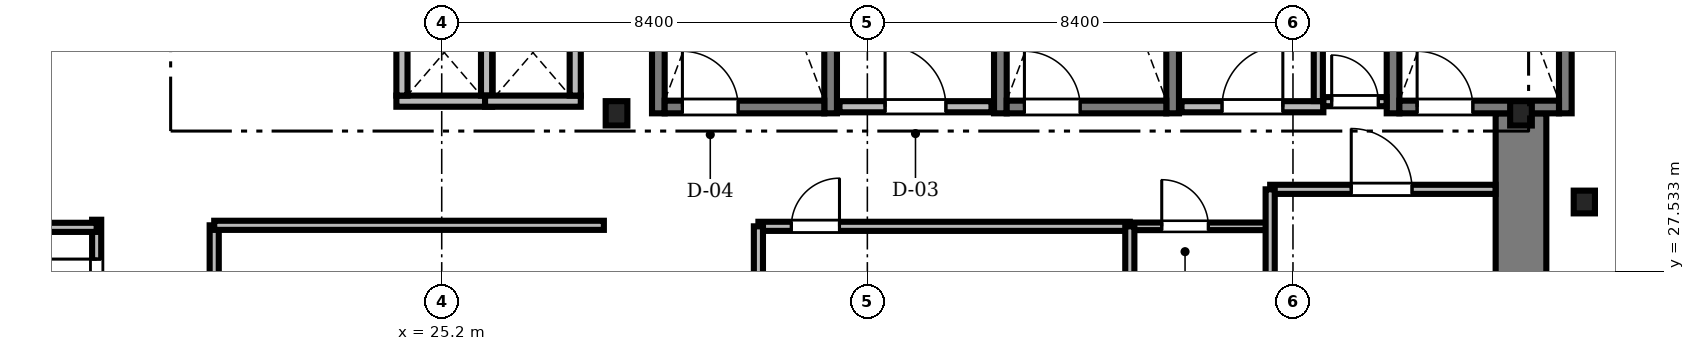
"""IFC4 building model, lengths in metres.
Left out: names, types, materials, properties, quantities, classifications, styles, units other than length and angle.
Written with IfcOpenShell. Run it as: python <this file> out.ifc"""

import sys

from ifc_helpers import new_model, si_unit, direction, frame, frame_2d, origin, origin_2d, place, context, subcontext, project, spatial, rectangle, i_section, extrude, source, transform, mapped, element, fill, save


model = new_model("IFC4")
c1 = context("Model", 3, precision=1e-05, world=origin(), true_north=direction((0.0, 1.0)))
c2 = subcontext(c1, "Body", "Model", "MODEL_VIEW")
j1 = project(units=[si_unit("LENGTHUNIT", "METRE"), si_unit("PLANEANGLEUNIT", "RADIAN")], contexts=[c1])
p1 = place(None, origin())
s1 = spatial("IfcSite", under=j1, at=p1, CompositionType="ELEMENT")
p2 = place(p1, origin())
s2 = spatial("IfcBuilding", under=s1, at=p2, CompositionType="ELEMENT")
p3 = place(p2, frame((0.0, 0.0, 38.55)))
s3 = spatial("IfcBuildingStorey", under=s2, at=p3, CompositionType="ELEMENT", Elevation=38.55)
m1 = source(origin(), c2, "Body", "SweptSolid", [
    extrude(rectangle(XDim=13.15, YDim=1.0, at=frame_2d((6.575, 0.0))), origin(), (0.0, 0.0, 1.0), 3.41),
])
p4 = place(p3, frame((46.5, 17.5, 0.0), z_axis=(0.0, 0.0, 1.0), x_axis=(0.0, 1.0, 0.0)))
e1 = element("IfcWall", 1, at=p4, inside=s3, PredefinedType="SHEAR", context=c2, shape_type="MappedRepresentation", body=[
    mapped(m1, transform((0.0, 0.0, 0.0), scale=1.0)),
])
m2 = source(origin(), c2, "Body", "SweptSolid", [
    extrude(i_section(OverallWidth=0.428, OverallDepth=0.481, WebThickness=0.04, FlangeThickness=0.063, FilletRadius=0.015, at=origin_2d()), origin(), (0.0, 0.0, 1.0), 3.41),
])
for number, where, z_axis, x_axis in (
    (2, (28.65, 30.65, 0.0), (0.0, 0.0, 1.0), (1.0, 0.0, 0.0)),
    (3, (46.5, 30.65, 0.0), (0.0, 0.0, 1.0), (1.0, 0.0, 0.0)),
):
    element("IfcColumn", number, at=place(p3, frame(where, z_axis=z_axis, x_axis=x_axis)), inside=s3, PredefinedType="COLUMN", context=c2, shape_type="MappedRepresentation", body=[
        mapped(m2, transform((0.0, 0.0, 0.0), scale=1.0)),
    ])
m3 = source(origin(), c2, "Body", "SweptSolid", [
    extrude(i_section(OverallWidth=0.419, OverallDepth=0.449, WebThickness=0.031, FlangeThickness=0.048, FilletRadius=0.015, at=origin_2d()), origin(), (0.0, 0.0, 1.0), 3.41),
])
p5 = place(p3, frame((47.75, 28.9, 0.0), z_axis=(0.0, 0.0, 1.0), x_axis=(1.0, 0.0, 0.0)))
e4 = element("IfcColumn", 4, at=p5, inside=s3, PredefinedType="COLUMN", context=c2, shape_type="MappedRepresentation", body=[
    mapped(m3, transform((0.0, 0.0, 0.0), scale=1.0)),
])
m4 = source(origin(), c2, "Body", "SweptSolid", [
    extrude(rectangle(XDim=9.15, YDim=0.25, at=frame_2d((4.575, 0.0))), origin(), (0.0, 0.0, 1.0), 3.45),
])
for number, where, z_axis, x_axis in (
    (5, (29.475, 30.65, 0.0), (0.0, 0.0, 1.0), (0.0, 1.0, 0.0)),
    (6, (32.875, 30.65, 0.0), (0.0, 0.0, 1.0), (0.0, 1.0, 0.0)),
):
    element("IfcWall", number, at=place(p3, frame(where, z_axis=z_axis, x_axis=x_axis)), inside=s3, PredefinedType="SOLIDWALL", context=c2, shape_type="MappedRepresentation", body=[
        mapped(m4, transform((0.0, 0.0, 0.0), scale=1.0)),
    ])
m5 = source(origin(), c2, "Body", "SweptSolid", [
    extrude(rectangle(XDim=3.15, YDim=0.25, at=frame_2d((1.575, 0.0))), origin(), (0.0, 0.0, 1.0), 3.45),
])
p6 = place(p3, frame((29.6, 30.775, 0.0), z_axis=(0.0, 0.0, 1.0), x_axis=(1.0, 0.0, 0.0)))
e7 = element("IfcWall", 7, at=p6, inside=s3, PredefinedType="SOLIDWALL", context=c2, shape_type="MappedRepresentation", body=[
    mapped(m5, transform((0.0, 0.0, 0.0), scale=1.0)),
])
m6 = source(origin(), c2, "Body", "SweptSolid", [
    extrude(rectangle(XDim=1.1, YDim=2.2, at=frame_2d((0.55, 1.1))), frame((0.0, 0.135, 0.0), z_axis=(0.0, -1.0, 0.0), x_axis=(1.0, 0.0, 0.0)), (0.0, 0.0, 1.0), 0.27),
])
p7 = place(p6, frame((0.35, 0.0, 0.0)))
e8 = element("IfcOpeningElement", 8, at=p7, cuts=e7, PredefinedType="OPENING", context=c2, shape_type="MappedRepresentation", body=[
    mapped(m6, transform((0.0, 0.0, 0.0), scale=1.0)),
])
for number, where, z_axis, x_axis in (
    (9, (36.225, 30.65, 0.0), (0.0, 0.0, 1.0), (0.0, 1.0, 0.0)),
    (10, (39.625, 30.65, 0.0), (0.0, 0.0, 1.0), (0.0, 1.0, 0.0)),
):
    element("IfcWall", number, at=place(p3, frame(where, z_axis=z_axis, x_axis=x_axis)), inside=s3, PredefinedType="SOLIDWALL", context=c2, shape_type="MappedRepresentation", body=[
        mapped(m4, transform((0.0, 0.0, 0.0), scale=1.0)),
    ])
p8 = place(p3, frame((36.35, 30.775, 0.0), z_axis=(0.0, 0.0, 1.0), x_axis=(1.0, 0.0, 0.0)))
e11 = element("IfcWall", 11, at=p8, inside=s3, PredefinedType="SOLIDWALL", context=c2, shape_type="MappedRepresentation", body=[
    mapped(m5, transform((0.0, 0.0, 0.0), scale=1.0)),
])
p9 = place(p8, frame((0.35, 0.0, 0.0)))
e12 = element("IfcOpeningElement", 12, at=p9, cuts=e11, PredefinedType="OPENING", context=c2, shape_type="MappedRepresentation", body=[
    mapped(m6, transform((0.0, 0.0, 0.0), scale=1.0)),
])
for number, where, z_axis, x_axis in (
    (13, (43.975, 30.65, 0.0), (0.0, 0.0, 1.0), (0.0, 1.0, 0.0)),
    (14, (47.375, 30.65, 0.0), (0.0, 0.0, 1.0), (0.0, 1.0, 0.0)),
):
    element("IfcWall", number, at=place(p3, frame(where, z_axis=z_axis, x_axis=x_axis)), inside=s3, PredefinedType="SOLIDWALL", context=c2, shape_type="MappedRepresentation", body=[
        mapped(m4, transform((0.0, 0.0, 0.0), scale=1.0)),
    ])
p10 = place(p3, frame((44.1, 30.775, 0.0), z_axis=(0.0, 0.0, 1.0), x_axis=(1.0, 0.0, 0.0)))
e15 = element("IfcWall", 15, at=p10, inside=s3, PredefinedType="SOLIDWALL", context=c2, shape_type="MappedRepresentation", body=[
    mapped(m5, transform((0.0, 0.0, 0.0), scale=1.0)),
])
p11 = place(p10, frame((0.35, 0.0, 0.0)))
e16 = element("IfcOpeningElement", 16, at=p11, cuts=e15, PredefinedType="OPENING", context=c2, shape_type="MappedRepresentation", body=[
    mapped(m6, transform((0.0, 0.0, 0.0), scale=1.0)),
])
m7 = source(origin(), c2, "Body", "SweptSolid", [
    extrude(rectangle(XDim=3.0, YDim=0.22, at=frame_2d((1.5, 0.0))), origin(), (0.0, 0.0, 1.0), 3.41),
])
p12 = place(p3, frame((33.05, 30.78, 0.0), z_axis=(0.0, 0.0, 1.0), x_axis=(1.0, 0.0, 0.0)))
e17 = element("IfcWall", 17, at=p12, inside=s3, PredefinedType="SOLIDWALL", context=c2, shape_type="MappedRepresentation", body=[
    mapped(m7, transform((0.0, 0.0, 0.0), scale=1.0)),
])
m8 = source(origin(), c2, "Body", "SweptSolid", [
    extrude(rectangle(XDim=1.2, YDim=2.2, at=frame_2d((0.6, 1.1))), frame((0.0, 0.12, 0.0), z_axis=(0.0, -1.0, 0.0), x_axis=(1.0, 0.0, 0.0)), (0.0, 0.0, 1.0), 0.24),
])
p13 = place(p12, frame((0.9, 0.0, 0.0)))
e18 = element("IfcOpeningElement", 18, at=p13, cuts=e17, PredefinedType="OPENING", context=c2, shape_type="MappedRepresentation", body=[
    mapped(m8, transform((0.0, 0.0, 0.0), scale=1.0)),
])
m9 = source(origin(), c2, "Body", "SweptSolid", [
    extrude(rectangle(XDim=2.8, YDim=0.22, at=frame_2d((1.4, 0.0))), origin(), (0.0, 0.0, 1.0), 3.41),
])
p14 = place(p3, frame((39.8, 30.78, 0.0), z_axis=(0.0, 0.0, 1.0), x_axis=(1.0, 0.0, 0.0)))
e19 = element("IfcWall", 19, at=p14, inside=s3, PredefinedType="SOLIDWALL", context=c2, shape_type="MappedRepresentation", body=[
    mapped(m9, transform((0.0, 0.0, 0.0), scale=1.0)),
])
p15 = place(p14, frame((0.8, 0.0, 0.0)))
e20 = element("IfcOpeningElement", 20, at=p15, cuts=e19, PredefinedType="OPENING", context=c2, shape_type="MappedRepresentation", body=[
    mapped(m8, transform((0.0, 0.0, 0.0), scale=1.0)),
])
m10 = source(origin(), c2, "Body", "SweptSolid", [
    extrude(rectangle(XDim=1.89, YDim=0.22, at=frame_2d((0.945, 0.0))), origin(), (0.0, 0.0, 1.0), 3.41),
])
p16 = place(p3, frame((24.305, 30.89, 0.0), z_axis=(0.0, 0.0, 1.0), x_axis=(1.0, 0.0, 0.0)))
e21 = element("IfcWall", 21, at=p16, inside=s3, PredefinedType="SOLIDWALL", context=c2, shape_type="MappedRepresentation", body=[
    mapped(m10, transform((0.0, 0.0, 0.0), scale=1.0)),
])
m11 = source(origin(), c2, "Body", "SweptSolid", [
    extrude(rectangle(XDim=1.7, YDim=0.22, at=frame_2d((0.85, 0.0))), origin(), (0.0, 0.0, 1.0), 3.41),
])
for number, where, z_axis, x_axis in (
    (22, (24.415, 31.0, 0.0), (0.0, 0.0, 1.0), (0.0, 1.0, 0.0)),
    (23, (26.085, 31.0, 0.0), (0.0, 0.0, 1.0), (0.0, 1.0, 0.0)),
):
    element("IfcWall", number, at=place(p3, frame(where, z_axis=z_axis, x_axis=x_axis)), inside=s3, PredefinedType="SOLIDWALL", context=c2, shape_type="MappedRepresentation", body=[
        mapped(m11, transform((0.0, 0.0, 0.0), scale=1.0)),
    ])
p17 = place(p3, frame((26.055, 30.89, 0.0), z_axis=(0.0, 0.0, 1.0), x_axis=(1.0, 0.0, 0.0)))
e24 = element("IfcWall", 24, at=p17, inside=s3, PredefinedType="SOLIDWALL", context=c2, shape_type="MappedRepresentation", body=[
    mapped(m10, transform((0.0, 0.0, 0.0), scale=1.0)),
])
p18 = place(p3, frame((27.835, 31.0, 0.0), z_axis=(0.0, 0.0, 1.0), x_axis=(0.0, 1.0, 0.0)))
e25 = element("IfcWall", 25, at=p18, inside=s3, PredefinedType="SOLIDWALL", context=c2, shape_type="MappedRepresentation", body=[
    mapped(m11, transform((0.0, 0.0, 0.0), scale=1.0)),
])
m12 = source(origin(), c2, "Body", "SweptSolid", [
    extrude(rectangle(XDim=13.84, YDim=0.18, at=frame_2d((6.92, 0.0))), origin(), (0.0, 0.0, 1.0), 2.802),
])
p19 = place(p3, frame((18.39, 14.71, 0.0), z_axis=(0.0, 0.0, 1.0), x_axis=(0.0, 1.0, 0.0)))
e26 = element("IfcWall", 26, at=p19, inside=s3, PredefinedType="PARTITIONING", context=c2, shape_type="MappedRepresentation", body=[
    mapped(m12, transform((0.0, 0.0, 0.0), scale=1.0)),
])
m13 = source(origin(), c2, "Body", "SweptSolid", [
    extrude(rectangle(XDim=1.05, YDim=2.2, at=frame_2d((0.525, 1.1))), frame((0.0, 0.1, 0.0), z_axis=(0.0, -1.0, 0.0), x_axis=(1.0, 0.0, 0.0)), (0.0, 0.0, 1.0), 0.2),
])
p20 = place(p19, frame((1.762, 0.0, 0.0)))
e27 = element("IfcOpeningElement", 27, at=p20, cuts=e26, PredefinedType="OPENING", context=c2, shape_type="MappedRepresentation", body=[
    mapped(m13, transform((0.0, 0.0, 0.0), scale=1.0)),
])
m14 = source(origin(), c2, "Body", "SweptSolid", [
    extrude(rectangle(XDim=0.95, YDim=2.15, at=frame_2d((0.475, 1.075))), frame((0.0, 0.1, 0.0), z_axis=(0.0, -1.0, 0.0), x_axis=(1.0, 0.0, 0.0)), (0.0, 0.0, 1.0), 0.2),
])
p21 = place(p19, frame((7.55, 0.0, 0.0)))
e28 = element("IfcOpeningElement", 28, at=p21, cuts=e26, PredefinedType="OPENING", context=c2, shape_type="MappedRepresentation", body=[
    mapped(m14, transform((0.0, 0.0, 0.0), scale=1.0)),
])
p22 = place(p19, frame((12.113, 0.0, 0.0)))
e29 = element("IfcOpeningElement", 29, at=p22, cuts=e26, PredefinedType="OPENING", context=c2, shape_type="MappedRepresentation", body=[
    mapped(m14, transform((0.0, 0.0, 0.0), scale=1.0)),
])
m15 = source(origin(), c2, "Body", "SweptSolid", [
    extrude(rectangle(XDim=11.94, YDim=0.18, at=frame_2d((5.97, 0.0))), origin(), (0.0, 0.0, 1.0), 2.802),
])
p23 = place(p3, frame((20.71, 16.5, 0.0), z_axis=(0.0, 0.0, 1.0), x_axis=(0.0, 1.0, 0.0)))
e30 = element("IfcWall", 30, at=p23, inside=s3, PredefinedType="PARTITIONING", context=c2, shape_type="MappedRepresentation", body=[
    mapped(m15, transform((0.0, 0.0, 0.0), scale=1.0)),
])
p24 = place(p23, frame((4.5, 0.0, 0.0)))
e31 = element("IfcOpeningElement", 31, at=p24, cuts=e30, PredefinedType="OPENING", context=c2, shape_type="MappedRepresentation", body=[
    mapped(m13, transform((0.0, 0.0, 0.0), scale=1.0)),
])
m16 = source(origin(), c2, "Body", "SweptSolid", [
    extrude(rectangle(XDim=7.33, YDim=0.18, at=frame_2d((3.665, 0.0))), origin(), (0.0, 0.0, 1.0), 3.042),
])
p25 = place(p3, frame((31.45, 28.42, 0.0), z_axis=(0.0, 0.0, 1.0), x_axis=(1.0, 0.0, 0.0)))
e32 = element("IfcWall", 32, at=p25, inside=s3, PredefinedType="PARTITIONING", context=c2, shape_type="MappedRepresentation", body=[
    mapped(m16, transform((0.0, 0.0, 0.0), scale=1.0)),
])
p26 = place(p25, frame((0.65, 0.0, 0.0)))
e33 = element("IfcOpeningElement", 33, at=p26, cuts=e32, PredefinedType="OPENING", context=c2, shape_type="MappedRepresentation", body=[
    mapped(m14, transform((0.0, 0.0, 0.0), scale=1.0)),
])
m17 = source(origin(), c2, "Body", "SweptSolid", [
    extrude(rectangle(XDim=4.448, YDim=0.18, at=frame_2d((2.224, 0.0))), origin(), (0.0, 0.0, 1.0), 3.042),
])
p27 = place(p3, frame((41.55, 29.15, 0.0), z_axis=(0.0, 0.0, 1.0), x_axis=(1.0, 0.0, 0.0)))
e34 = element("IfcWall", 34, at=p27, inside=s3, PredefinedType="PARTITIONING", context=c2, shape_type="MappedRepresentation", body=[
    mapped(m17, transform((0.0, 0.0, 0.0), scale=1.0)),
])
m18 = source(origin(), c2, "Body", "SweptSolid", [
    extrude(rectangle(XDim=1.2, YDim=2.2, at=frame_2d((0.6, 1.1))), frame((0.0, 0.1, 0.0), z_axis=(0.0, -1.0, 0.0), x_axis=(1.0, 0.0, 0.0)), (0.0, 0.0, 1.0), 0.2),
])
p28 = place(p27, frame((1.6, 0.0, 0.0)))
e35 = element("IfcOpeningElement", 35, at=p28, cuts=e34, PredefinedType="OPENING", context=c2, shape_type="MappedRepresentation", body=[
    mapped(m18, transform((0.0, 0.0, 0.0), scale=1.0)),
])
m19 = source(origin(), c2, "Body", "SweptSolid", [
    extrude(rectangle(XDim=2.74, YDim=0.15, at=frame_2d((1.37, 0.0))), origin(), (0.0, 0.0, 1.0), 3.41),
])
p29 = place(p3, frame((38.78, 28.42, 0.0), z_axis=(0.0, 0.0, 1.0), x_axis=(1.0, 0.0, 0.0)))
e36 = element("IfcWall", 36, at=p29, inside=s3, PredefinedType="PARTITIONING", context=c2, shape_type="MappedRepresentation", body=[
    mapped(m19, transform((0.0, 0.0, 0.0), scale=1.0)),
])
m20 = source(origin(), c2, "Body", "SweptSolid", [
    extrude(rectangle(XDim=0.92, YDim=2.1, at=frame_2d((0.46, 1.05))), frame((0.0, 0.085, 0.0), z_axis=(0.0, -1.0, 0.0), x_axis=(1.0, 0.0, 0.0)), (0.0, 0.0, 1.0), 0.17),
])
p30 = place(p29, frame((0.63, 0.0, 0.0)))
e37 = element("IfcOpeningElement", 37, at=p30, cuts=e36, PredefinedType="OPENING", context=c2, shape_type="MappedRepresentation", body=[
    mapped(m20, transform((0.0, 0.0, 0.0), scale=1.0)),
])
m21 = source(origin(), c2, "Body", "SweptSolid", [
    extrude(rectangle(XDim=1.248, YDim=0.18, at=frame_2d((0.624, 0.0))), origin(), (0.0, 0.0, 1.0), 3.41),
])
p31 = place(p3, frame((42.6, 30.88, 0.0), z_axis=(0.0, 0.0, 1.0), x_axis=(1.0, 0.0, 0.0)))
e38 = element("IfcWall", 38, at=p31, inside=s3, PredefinedType="PARTITIONING", context=c2, shape_type="MappedRepresentation", body=[
    mapped(m21, transform((0.0, 0.0, 0.0), scale=1.0)),
])
m22 = source(origin(), c2, "Body", "SweptSolid", [
    extrude(rectangle(XDim=0.92, YDim=2.1, at=frame_2d((0.46, 1.05))), frame((0.0, 0.1, 0.0), z_axis=(0.0, -1.0, 0.0), x_axis=(1.0, 0.0, 0.0)), (0.0, 0.0, 1.0), 0.2),
])
p32 = place(p31, frame((0.164, 0.0, 0.0)))
e39 = element("IfcOpeningElement", 39, at=p32, cuts=e38, PredefinedType="OPENING", context=c2, shape_type="MappedRepresentation", body=[
    mapped(m22, transform((0.0, 0.0, 0.0), scale=1.0)),
])
m23 = source(origin(), c2, "Body", "SweptSolid", [
    extrude(rectangle(XDim=16.16, YDim=0.18, at=frame_2d((8.08, 0.0))), origin(), (0.0, 0.0, 1.0), 2.652),
])
p33 = place(p3, frame((2.23, 28.4, 0.0), z_axis=(0.0, 0.0, 1.0), x_axis=(1.0, 0.0, 0.0)))
e40 = element("IfcWall", 40, at=p33, inside=s3, PredefinedType="PARTITIONING", context=c2, shape_type="MappedRepresentation", body=[
    mapped(m23, transform((0.0, 0.0, 0.0), scale=1.0)),
])
m24 = source(origin(), c2, "Body", "SweptSolid", [
    extrude(rectangle(XDim=7.69, YDim=0.18, at=frame_2d((3.845, 0.0))), origin(), (0.0, 0.0, 1.0), 3.41),
])
p34 = place(p3, frame((20.71, 28.44, 0.0), z_axis=(0.0, 0.0, 1.0), x_axis=(1.0, 0.0, 0.0)))
e41 = element("IfcWall", 41, at=p34, inside=s3, PredefinedType="PARTITIONING", context=c2, shape_type="MappedRepresentation", body=[
    mapped(m24, transform((0.0, 0.0, 0.0), scale=1.0)),
])
m25 = source(origin(), c2, "Body", "SweptSolid", [
    extrude(rectangle(XDim=2.758, YDim=0.18, at=frame_2d((1.379, 0.0))), origin(), (0.0, 0.0, 1.0), 3.41),
])
p35 = place(p3, frame((42.5, 30.892, 0.0), z_axis=(0.0, 0.0, 1.0), x_axis=(0.0, 1.0, 0.0)))
e42 = element("IfcWall", 42, at=p35, inside=s3, PredefinedType="PARTITIONING", context=c2, shape_type="MappedRepresentation", body=[
    mapped(m25, transform((0.0, 0.0, 0.0), scale=1.0)),
])
m26 = source(origin(), c2, "Body", "SweptSolid", [
    extrude(rectangle(XDim=2.35, YDim=0.18, at=frame_2d((1.175, 0.0))), origin(), (0.0, 0.0, 1.0), 2.802),
])
p36 = place(p3, frame((41.55, 26.8, 0.0), z_axis=(0.0, 0.0, 1.0), x_axis=(0.0, 1.0, 0.0)))
e43 = element("IfcWall", 43, at=p36, inside=s3, PredefinedType="PARTITIONING", context=c2, shape_type="MappedRepresentation", body=[
    mapped(m26, transform((0.0, 0.0, 0.0), scale=1.0)),
])
m27 = source(origin(), c2, "Body", "SweptSolid", [
    extrude(rectangle(XDim=1.6, YDim=0.18, at=frame_2d((0.8, 0.0))), origin(), (0.0, 0.0, 1.0), 2.952),
])
for number, where, z_axis, x_axis in (
    (44, (31.45, 26.82, 0.0), (0.0, 0.0, 1.0), (0.0, 1.0, 0.0)),
    (45, (38.78, 26.82, 0.0), (0.0, 0.0, 1.0), (0.0, 1.0, 0.0)),
):
    element("IfcWall", number, at=place(p3, frame(where, z_axis=z_axis, x_axis=x_axis)), inside=s3, PredefinedType="PARTITIONING", context=c2, shape_type="MappedRepresentation", body=[
        mapped(m27, transform((0.0, 0.0, 0.0), scale=1.0)),
    ])
m28 = source(origin(), c2, "Body", "SweptSolid", [
    extrude(rectangle(XDim=1.1, YDim=2.2, at=frame_2d((0.55, 1.1))), frame((0.0, 0.025, 0.0), z_axis=(0.0, -1.0, 0.0), x_axis=(1.0, 0.0, 0.0)), (0.0, 0.0, 1.0), 0.05),
])
p37 = place(p7, origin())
e46 = element("IfcDoor", 46, at=p37, inside=s3, OperationType="SINGLE_SWING_LEFT", PredefinedType="DOOR", context=c2, shape_type="MappedRepresentation", body=[
    mapped(m28, transform((0.0, 0.0, 0.0), scale=1.0)),
])
fill(e8, e46)
p38 = place(p9, origin())
e47 = element("IfcDoor", 47, at=p38, inside=s3, OperationType="SINGLE_SWING_LEFT", PredefinedType="DOOR", context=c2, shape_type="MappedRepresentation", body=[
    mapped(m28, transform((0.0, 0.0, 0.0), scale=1.0)),
])
fill(e12, e47)
p39 = place(p11, origin())
e48 = element("IfcDoor", 48, at=p39, inside=s3, OperationType="SINGLE_SWING_LEFT", PredefinedType="DOOR", context=c2, shape_type="MappedRepresentation", body=[
    mapped(m28, transform((0.0, 0.0, 0.0), scale=1.0)),
])
fill(e16, e48)
m29 = source(origin(), c2, "Body", "SweptSolid", [
    extrude(rectangle(XDim=1.2, YDim=2.2, at=frame_2d((0.6, 1.1))), frame((0.0, 0.025, 0.0), z_axis=(0.0, -1.0, 0.0), x_axis=(1.0, 0.0, 0.0)), (0.0, 0.0, 1.0), 0.05),
])
p40 = place(p13, origin())
e49 = element("IfcDoor", 49, at=p40, inside=s3, OperationType="SINGLE_SWING_LEFT", PredefinedType="DOOR", context=c2, shape_type="MappedRepresentation", body=[
    mapped(m29, transform((0.0, 0.0, 0.0), scale=1.0)),
])
fill(e18, e49)
p41 = place(p15, origin())
e50 = element("IfcDoor", 50, at=p41, inside=s3, OperationType="SINGLE_SWING_RIGHT", PredefinedType="DOOR", context=c2, shape_type="MappedRepresentation", body=[
    mapped(m29, transform((0.0, 0.0, 0.0), scale=1.0)),
])
fill(e20, e50)
m30 = source(origin(), c2, "Body", "SweptSolid", [
    extrude(rectangle(XDim=0.95, YDim=2.15, at=frame_2d((0.475, 1.075))), frame((0.0, 0.025, 0.0), z_axis=(0.0, -1.0, 0.0), x_axis=(1.0, 0.0, 0.0)), (0.0, 0.0, 1.0), 0.05),
])
p42 = place(p22, origin())
e51 = element("IfcDoor", 51, at=p42, inside=s3, OperationType="SINGLE_SWING_RIGHT", PredefinedType="DOOR", context=c2, shape_type="MappedRepresentation", body=[
    mapped(m30, transform((0.0, 0.0, 0.0), scale=1.0)),
])
fill(e29, e51)
p43 = place(p26, origin())
e52 = element("IfcDoor", 52, at=p43, inside=s3, OperationType="SINGLE_SWING_RIGHT", PredefinedType="DOOR", context=c2, shape_type="MappedRepresentation", body=[
    mapped(m30, transform((0.0, 0.0, 0.0), scale=1.0)),
])
fill(e33, e52)
p44 = place(p28, origin())
e53 = element("IfcDoor", 53, at=p44, inside=s3, OperationType="SINGLE_SWING_LEFT", PredefinedType="DOOR", context=c2, shape_type="MappedRepresentation", body=[
    mapped(m29, transform((0.0, 0.0, 0.0), scale=1.0)),
])
fill(e35, e53)
m31 = source(origin(), c2, "Body", "SweptSolid", [
    extrude(rectangle(XDim=0.92, YDim=2.1, at=frame_2d((0.46, 1.05))), frame((0.0, 0.025, 0.0), z_axis=(0.0, -1.0, 0.0), x_axis=(1.0, 0.0, 0.0)), (0.0, 0.0, 1.0), 0.05),
])
p45 = place(p30, origin())
e54 = element("IfcDoor", 54, at=p45, inside=s3, OperationType="SINGLE_SWING_LEFT", PredefinedType="DOOR", context=c2, shape_type="MappedRepresentation", body=[
    mapped(m31, transform((0.0, 0.0, 0.0), scale=1.0)),
])
fill(e37, e54)
p46 = place(p32, origin())
e55 = element("IfcDoor", 55, at=p46, inside=s3, OperationType="SINGLE_SWING_LEFT", PredefinedType="DOOR", context=c2, shape_type="MappedRepresentation", body=[
    mapped(m31, transform((0.0, 0.0, 0.0), scale=1.0)),
])
fill(e39, e55)
save(model, sys.argv[1])
